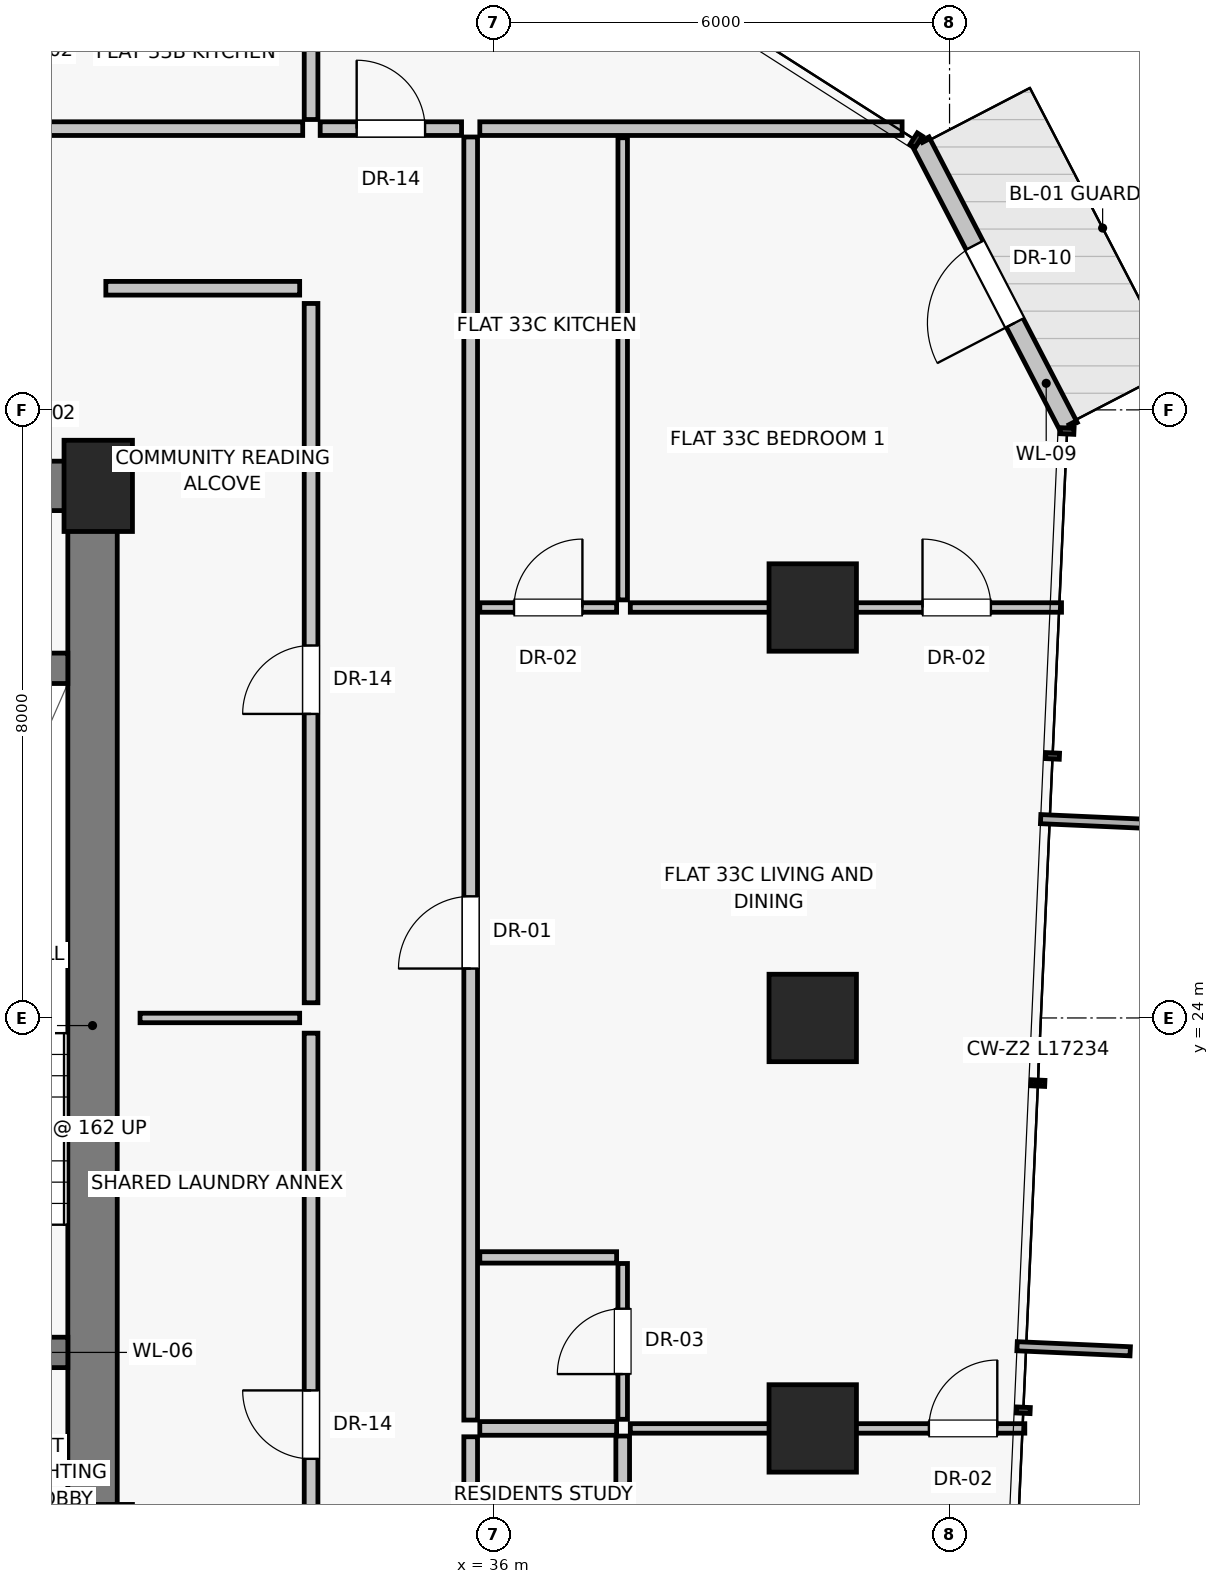
"""IFC4 building model, lengths in metres.
Left out: names, types, materials, properties, quantities, classifications, styles, units other than length and angle.
Written with IfcOpenShell. Run it as: python <this file> out.ifc"""

import sys

from ifc_helpers import new_model, si_unit, direction, frame, frame_2d, origin, origin_2d, place, context, subcontext, project, spatial, rectangle, extrude, source, transform, mapped, element, fill, save


model = new_model("IFC4")
c1 = context("Model", 3, precision=1e-05, world=origin(), true_north=direction((0.0, 1.0)))
c2 = subcontext(c1, "Body", "Model", "MODEL_VIEW")
j1 = project(units=[si_unit("LENGTHUNIT", "METRE"), si_unit("PLANEANGLEUNIT", "RADIAN")], contexts=[c1])
p1 = place(None, origin())
s1 = spatial("IfcSite", under=j1, at=p1, CompositionType="ELEMENT")
p2 = place(p1, origin())
s2 = spatial("IfcBuilding", under=s1, at=p2, CompositionType="ELEMENT")
p3 = place(p2, frame((0.0, 0.0, 119.75)))
s3 = spatial("IfcBuildingStorey", under=s2, at=p3, CompositionType="ELEMENT", Elevation=119.75)
p4 = place(p3, frame((30.8, 31.0, 0.0), z_axis=(0.0, 0.0, 1.0), x_axis=(1.0, 0.0, 0.0)))
e1 = element("IfcColumn", 1, at=p4, inside=s3, PredefinedType="PILASTER", context=c2, shape_type="SweptSolid", body=[
    extrude(rectangle(XDim=0.9, YDim=1.2, at=origin_2d()), origin(), (0.0, 0.0, 1.0), 3.25),
])
for number, where, z_axis, x_axis in (
    (2, (40.2, 18.6, 0.0), (0.0, 0.0, 1.0), (1.0, 0.0, 0.0)),
    (3, (40.2, 24.0, 0.0), (0.0, 0.0, 1.0), (1.0, 0.0, 0.0)),
    (4, (40.2, 29.4, 0.0), (0.0, 0.0, 1.0), (1.0, 0.0, 0.0)),
):
    element("IfcColumn", number, at=place(p3, frame(where, z_axis=z_axis, x_axis=x_axis)), inside=s3, PredefinedType="COLUMN", context=c2, shape_type="SweptSolid", body=[
        extrude(rectangle(XDim=1.15, YDim=1.15, at=origin_2d()), origin(), (0.0, 0.0, 1.0), 3.25),
    ])
p5 = place(p3, frame((43.569, 31.776, 0.0), z_axis=(0.0, 0.0, 1.0), x_axis=(-0.460795178744, 0.887506508847, 0.0)))
e5 = element("IfcWall", 5, at=p5, inside=s3, PredefinedType="SOLIDWALL", context=c2, shape_type="SweptSolid", body=[
    extrude(rectangle(XDim=4.233, YDim=0.25, at=frame_2d((2.117, 0.0))), origin(), (0.0, 0.0, 1.0), 3.0),
])
p6 = place(p5, frame((1.542, 0.0, 0.0)))
e6 = element("IfcOpeningElement", 6, at=p6, cuts=e5, PredefinedType="OPENING", context=c2, shape_type="SweptSolid", body=[
    extrude(rectangle(XDim=1.15, YDim=2.25, at=frame_2d((0.575, 1.125))), frame((0.0, 0.135, 0.0), z_axis=(0.0, -1.0, 0.0), x_axis=(1.0, 0.0, 0.0)), (0.0, 0.0, 1.0), 0.27),
])
p7 = place(p3, frame((30.725, 16.8, 0.0), z_axis=(0.0, 0.0, 1.0), x_axis=(0.0, 1.0, 0.0)))
e7 = element("IfcWall", 7, at=p7, inside=s3, PredefinedType="SHEAR", context=c2, shape_type="SweptSolid", body=[
    extrude(rectangle(XDim=14.2, YDim=0.65, at=frame_2d((7.1, 0.0))), origin(), (0.0, 0.0, 1.0), 3.0),
])
p8 = place(p3, frame((27.0, 31.0, 0.0), z_axis=(0.0, 0.0, 1.0), x_axis=(1.0, 0.0, 0.0)))
e8 = element("IfcWall", 8, at=p8, inside=s3, PredefinedType="SHEAR", context=c2, shape_type="SweptSolid", body=[
    extrude(rectangle(XDim=3.8, YDim=0.65, at=frame_2d((1.9, 0.0))), origin(), (0.0, 0.0, 1.0), 3.0),
])
p9 = place(p8, frame((1.15, 0.0, 0.0)))
e9 = element("IfcOpeningElement", 9, at=p9, cuts=e8, PredefinedType="OPENING", context=c2, shape_type="SweptSolid", body=[
    extrude(rectangle(XDim=1.0, YDim=2.01, at=frame_2d((0.5, 1.005))), frame((0.0, 0.335, 0.0), z_axis=(0.0, -1.0, 0.0), x_axis=(1.0, 0.0, 0.0)), (0.0, 0.0, 1.0), 0.67),
])
p10 = place(p3, frame((27.0, 19.6, 0.0), z_axis=(0.0, 0.0, 1.0), x_axis=(1.0, 0.0, 0.0)))
e10 = element("IfcWall", 10, at=p10, inside=s3, PredefinedType="SHEAR", context=c2, shape_type="SweptSolid", body=[
    extrude(rectangle(XDim=3.4, YDim=0.4, at=frame_2d((1.7, 0.0))), origin(), (0.0, 0.0, 1.0), 3.0),
])
p11 = place(p10, frame((1.05, 0.0, 0.0)))
e11 = element("IfcOpeningElement", 11, at=p11, cuts=e10, PredefinedType="OPENING", context=c2, shape_type="SweptSolid", body=[
    extrude(rectangle(XDim=1.1, YDim=2.03, at=frame_2d((0.55, 1.015))), frame((0.0, 0.21, 0.0), z_axis=(0.0, -1.0, 0.0), x_axis=(1.0, 0.0, 0.0)), (0.0, 0.0, 1.0), 0.42),
])
p12 = place(p3, frame((27.0, 28.6, 0.0), z_axis=(0.0, 0.0, 1.0), x_axis=(1.0, 0.0, 0.0)))
e12 = element("IfcWall", 12, at=p12, inside=s3, PredefinedType="SHEAR", context=c2, shape_type="SweptSolid", body=[
    extrude(rectangle(XDim=3.4, YDim=0.4, at=frame_2d((1.7, 0.0))), origin(), (0.0, 0.0, 1.0), 3.0),
])
p13 = place(p3, frame((33.6, 14.4, 0.0), z_axis=(0.0, 0.0, 1.0), x_axis=(0.0, 1.0, 0.0)))
e13 = element("IfcWall", 13, at=p13, inside=s3, PredefinedType="PARTITIONING", context=c2, shape_type="SweptSolid", body=[
    extrude(rectangle(XDim=9.4, YDim=0.18, at=frame_2d((4.7, 0.0))), origin(), (0.0, 0.0, 1.0), 3.0),
])
p14 = place(p13, frame((3.8, 0.0, 0.0)))
e14 = element("IfcOpeningElement", 14, at=p14, cuts=e13, PredefinedType="OPENING", context=c2, shape_type="SweptSolid", body=[
    extrude(rectangle(XDim=0.9, YDim=2.01, at=frame_2d((0.45, 1.005))), frame((0.0, 0.1, 0.0), z_axis=(0.0, -1.0, 0.0), x_axis=(1.0, 0.0, 0.0)), (0.0, 0.0, 1.0), 0.2),
])
p15 = place(p3, frame((33.6, 24.2, 0.0), z_axis=(0.0, 0.0, 1.0), x_axis=(0.0, 1.0, 0.0)))
e15 = element("IfcWall", 15, at=p15, inside=s3, PredefinedType="PARTITIONING", context=c2, shape_type="SweptSolid", body=[
    extrude(rectangle(XDim=9.2, YDim=0.18, at=frame_2d((4.6, 0.0))), origin(), (0.0, 0.0, 1.0), 3.0),
])
p16 = place(p15, frame((3.8, 0.0, 0.0)))
e16 = element("IfcOpeningElement", 16, at=p16, cuts=e15, PredefinedType="OPENING", context=c2, shape_type="SweptSolid", body=[
    extrude(rectangle(XDim=0.9, YDim=2.01, at=frame_2d((0.45, 1.005))), frame((0.0, 0.1, 0.0), z_axis=(0.0, -1.0, 0.0), x_axis=(1.0, 0.0, 0.0)), (0.0, 0.0, 1.0), 0.2),
])
p17 = place(p3, frame((31.35, 24.0, 0.0), z_axis=(0.0, 0.0, 1.0), x_axis=(1.0, 0.0, 0.0)))
e17 = element("IfcWall", 17, at=p17, inside=s3, PredefinedType="PARTITIONING", context=c2, shape_type="SweptSolid", body=[
    extrude(rectangle(XDim=2.1, YDim=0.125, at=frame_2d((1.05, 0.0))), origin(), (0.0, 0.0, 1.0), 3.0),
])
p18 = place(p3, frame((30.9, 33.6, 0.0), z_axis=(0.0, 0.0, 1.0), x_axis=(1.0, 0.0, 0.0)))
e18 = element("IfcWall", 18, at=p18, inside=s3, PredefinedType="PARTITIONING", context=c2, shape_type="SweptSolid", body=[
    extrude(rectangle(XDim=2.55, YDim=0.18, at=frame_2d((1.275, 0.0))), origin(), (0.0, 0.0, 1.0), 3.0),
])
p19 = place(p3, frame((33.6, 35.82, 0.0), z_axis=(0.0, 0.0, 1.0), x_axis=(0.0, 1.0, 0.0)))
e19 = element("IfcWall", 19, at=p19, inside=s3, PredefinedType="PARTITIONING", context=c2, shape_type="SweptSolid", body=[
    extrude(rectangle(XDim=4.845, YDim=0.18, at=frame_2d((2.423, 0.0))), origin(), (0.0, 0.0, 1.0), 3.0),
])
p20 = place(p3, frame((18.71, 35.7, 0.0), z_axis=(0.0, 0.0, 1.0), x_axis=(1.0, 0.0, 0.0)))
e20 = element("IfcWall", 20, at=p20, inside=s3, PredefinedType="PARTITIONING", context=c2, shape_type="SweptSolid", body=[
    extrude(rectangle(XDim=14.78, YDim=0.18, at=frame_2d((7.39, 0.0))), origin(), (0.0, 0.0, 1.0), 2.58),
])
p21 = place(p20, frame((5.94, 0.0, 0.0)))
e21 = element("IfcOpeningElement", 21, at=p21, cuts=e20, PredefinedType="OPENING", context=c2, shape_type="SweptSolid", body=[
    extrude(rectangle(XDim=0.95, YDim=2.02, at=frame_2d((0.475, 1.01))), frame((0.0, 0.1, 0.0), z_axis=(0.0, -1.0, 0.0), x_axis=(1.0, 0.0, 0.0)), (0.0, 0.0, 1.0), 0.2),
])
p22 = place(p3, frame((35.82, 35.7, 0.0), z_axis=(0.0, 0.0, 1.0), x_axis=(1.0, 0.0, 0.0)))
e22 = element("IfcWall", 22, at=p22, inside=s3, PredefinedType="PARTITIONING", context=c2, shape_type="SweptSolid", body=[
    extrude(rectangle(XDim=5.556, YDim=0.18, at=frame_2d((2.778, 0.0))), origin(), (0.0, 0.0, 1.0), 3.0),
])
p23 = place(p3, frame((35.7, 12.21, 0.0), z_axis=(0.0, 0.0, 1.0), x_axis=(0.0, 1.0, 0.0)))
e23 = element("IfcWall", 23, at=p23, inside=s3, PredefinedType="PARTITIONING", context=c2, shape_type="SweptSolid", body=[
    extrude(rectangle(XDim=6.28, YDim=0.18, at=frame_2d((3.14, 0.0))), origin(), (0.0, 0.0, 1.0), 2.58),
])
p24 = place(p23, frame((2.64, 0.0, 0.0)))
e24 = element("IfcOpeningElement", 24, at=p24, cuts=e23, PredefinedType="OPENING", context=c2, shape_type="SweptSolid", body=[
    extrude(rectangle(XDim=1.0, YDim=2.01, at=frame_2d((0.5, 1.005))), frame((0.0, 0.1, 0.0), z_axis=(0.0, -1.0, 0.0), x_axis=(1.0, 0.0, 0.0)), (0.0, 0.0, 1.0), 0.2),
])
p25 = place(p3, frame((35.7, 18.71, 0.0), z_axis=(0.0, 0.0, 1.0), x_axis=(0.0, 1.0, 0.0)))
e25 = element("IfcWall", 25, at=p25, inside=s3, PredefinedType="PARTITIONING", context=c2, shape_type="SweptSolid", body=[
    extrude(rectangle(XDim=16.88, YDim=0.18, at=frame_2d((8.44, 0.0))), origin(), (0.0, 0.0, 1.0), 2.58),
])
p26 = place(p25, frame((5.94, 0.0, 0.0)))
e26 = element("IfcOpeningElement", 26, at=p26, cuts=e25, PredefinedType="OPENING", context=c2, shape_type="SweptSolid", body=[
    extrude(rectangle(XDim=0.95, YDim=2.02, at=frame_2d((0.475, 1.01))), frame((0.0, 0.1, 0.0), z_axis=(0.0, -1.0, 0.0), x_axis=(1.0, 0.0, 0.0)), (0.0, 0.0, 1.0), 0.2),
])
p27 = place(p3, frame((37.7, 12.22, 0.0), z_axis=(0.0, 0.0, 1.0), x_axis=(0.0, 1.0, 0.0)))
e27 = element("IfcWall", 27, at=p27, inside=s3, PredefinedType="PARTITIONING", context=c2, shape_type="SweptSolid", body=[
    extrude(rectangle(XDim=6.28, YDim=0.18, at=frame_2d((3.14, 0.0))), origin(), (0.0, 0.0, 1.0), 3.0),
])
p28 = place(p3, frame((35.82, 18.6, 0.0), z_axis=(0.0, 0.0, 1.0), x_axis=(1.0, 0.0, 0.0)))
e28 = element("IfcWall", 28, at=p28, inside=s3, PredefinedType="PARTITIONING", context=c2, shape_type="SweptSolid", body=[
    extrude(rectangle(XDim=1.8, YDim=0.18, at=frame_2d((0.9, 0.0))), origin(), (0.0, 0.0, 1.0), 2.378),
])
p29 = place(p3, frame((37.8, 18.6, 0.0), z_axis=(0.0, 0.0, 1.0), x_axis=(1.0, 0.0, 0.0)))
e29 = element("IfcWall", 29, at=p29, inside=s3, PredefinedType="PARTITIONING", context=c2, shape_type="SweptSolid", body=[
    extrude(rectangle(XDim=5.19, YDim=0.125, at=frame_2d((2.595, 0.0))), origin(), (0.0, 0.0, 1.0), 2.378),
])
p30 = place(p29, frame((3.928, 0.0, 0.0)))
e30 = element("IfcOpeningElement", 30, at=p30, cuts=e29, PredefinedType="OPENING", context=c2, shape_type="SweptSolid", body=[
    extrude(rectangle(XDim=0.9, YDim=2.01, at=frame_2d((0.45, 1.005))), frame((0.0, 0.073, 0.0), z_axis=(0.0, -1.0, 0.0), x_axis=(1.0, 0.0, 0.0)), (0.0, 0.0, 1.0), 0.145),
])
p31 = place(p3, frame((35.82, 20.85, 0.0), z_axis=(0.0, 0.0, 1.0), x_axis=(1.0, 0.0, 0.0)))
e31 = element("IfcWall", 31, at=p31, inside=s3, PredefinedType="PARTITIONING", context=c2, shape_type="SweptSolid", body=[
    extrude(rectangle(XDim=1.8, YDim=0.15, at=frame_2d((0.9, 0.0))), origin(), (0.0, 0.0, 1.0), 3.0),
])
p32 = place(p3, frame((37.7, 18.72, 0.0), z_axis=(0.0, 0.0, 1.0), x_axis=(0.0, 1.0, 0.0)))
e32 = element("IfcWall", 32, at=p32, inside=s3, PredefinedType="PARTITIONING", context=c2, shape_type="SweptSolid", body=[
    extrude(rectangle(XDim=2.05, YDim=0.125, at=frame_2d((1.025, 0.0))), origin(), (0.0, 0.0, 1.0), 3.0),
])
p33 = place(p32, frame((0.595, 0.0, 0.0)))
e33 = element("IfcOpeningElement", 33, at=p33, cuts=e32, PredefinedType="OPENING", context=c2, shape_type="SweptSolid", body=[
    extrude(rectangle(XDim=0.86, YDim=2.01, at=frame_2d((0.43, 1.005))), frame((0.0, 0.073, 0.0), z_axis=(0.0, -1.0, 0.0), x_axis=(1.0, 0.0, 0.0)), (0.0, 0.0, 1.0), 0.145),
])
p34 = place(p3, frame((35.82, 29.4, 0.0), z_axis=(0.0, 0.0, 1.0), x_axis=(1.0, 0.0, 0.0)))
e34 = element("IfcWall", 34, at=p34, inside=s3, PredefinedType="PARTITIONING", context=c2, shape_type="SweptSolid", body=[
    extrude(rectangle(XDim=1.8, YDim=0.125, at=frame_2d((0.9, 0.0))), origin(), (0.0, 0.0, 1.0), 2.378),
])
p35 = place(p34, frame((0.45, 0.0, 0.0)))
e35 = element("IfcOpeningElement", 35, at=p35, cuts=e34, PredefinedType="OPENING", context=c2, shape_type="SweptSolid", body=[
    extrude(rectangle(XDim=0.9, YDim=2.01, at=frame_2d((0.45, 1.005))), frame((0.0, 0.073, 0.0), z_axis=(0.0, -1.0, 0.0), x_axis=(1.0, 0.0, 0.0)), (0.0, 0.0, 1.0), 0.145),
])
p36 = place(p3, frame((37.7, 29.5, 0.0), z_axis=(0.0, 0.0, 1.0), x_axis=(0.0, 1.0, 0.0)))
e36 = element("IfcWall", 36, at=p36, inside=s3, PredefinedType="PARTITIONING", context=c2, shape_type="SweptSolid", body=[
    extrude(rectangle(XDim=6.08, YDim=0.125, at=frame_2d((3.04, 0.0))), origin(), (0.0, 0.0, 1.0), 3.0),
])
p37 = place(p3, frame((37.8, 29.4, 0.0), z_axis=(0.0, 0.0, 1.0), x_axis=(1.0, 0.0, 0.0)))
e37 = element("IfcWall", 37, at=p37, inside=s3, PredefinedType="PARTITIONING", context=c2, shape_type="SweptSolid", body=[
    extrude(rectangle(XDim=5.673, YDim=0.125, at=frame_2d((2.836, 0.0))), origin(), (0.0, 0.0, 1.0), 2.378),
])
p38 = place(p37, frame((3.844, 0.0, 0.0)))
e38 = element("IfcOpeningElement", 38, at=p38, cuts=e37, PredefinedType="OPENING", context=c2, shape_type="SweptSolid", body=[
    extrude(rectangle(XDim=0.9, YDim=2.01, at=frame_2d((0.45, 1.005))), frame((0.0, 0.073, 0.0), z_axis=(0.0, -1.0, 0.0), x_axis=(1.0, 0.0, 0.0)), (0.0, 0.0, 1.0), 0.145),
])
p39 = place(p3, frame((33.72, 35.7, 0.0), z_axis=(0.0, 0.0, 1.0), x_axis=(1.0, 0.0, 0.0)))
e39 = element("IfcWall", 39, at=p39, inside=s3, PredefinedType="PARTITIONING", context=c2, shape_type="SweptSolid", body=[
    extrude(rectangle(XDim=1.86, YDim=0.18, at=frame_2d((0.93, 0.0))), origin(), (0.0, 0.0, 1.0), 3.0),
])
p40 = place(p39, frame((0.48, 0.0, 0.0)))
e40 = element("IfcOpeningElement", 40, at=p40, cuts=e39, PredefinedType="OPENING", context=c2, shape_type="SweptSolid", body=[
    extrude(rectangle(XDim=0.9, YDim=2.01, at=frame_2d((0.45, 1.005))), frame((0.0, 0.1, 0.0), z_axis=(0.0, -1.0, 0.0), x_axis=(1.0, 0.0, 0.0)), (0.0, 0.0, 1.0), 0.2),
])
m1 = source(origin(), c2, "Body", "SweptSolid", [
    extrude(rectangle(XDim=1.15, YDim=2.25, at=frame_2d((0.575, 1.125))), frame((0.0, 0.025, 0.0), z_axis=(0.0, -1.0, 0.0), x_axis=(1.0, 0.0, 0.0)), (0.0, 0.0, 1.0), 0.05),
])
p41 = place(p6, frame((1.15, 0.0, 0.0), z_axis=(0.0, 0.0, 1.0), x_axis=(-1.0, 0.0, 0.0)))
e41 = element("IfcDoor", 41, at=p41, inside=s3, OperationType="SINGLE_SWING_LEFT", PredefinedType="DOOR", context=c2, shape_type="MappedRepresentation", body=[
    mapped(m1, transform((0.0, 0.0, 0.0), scale=1.0)),
])
fill(e6, e41)
m2 = source(origin(), c2, "Body", "SweptSolid", [
    extrude(rectangle(XDim=0.9, YDim=2.01, at=frame_2d((0.45, 1.005))), frame((0.0, 0.025, 0.0), z_axis=(0.0, -1.0, 0.0), x_axis=(1.0, 0.0, 0.0)), (0.0, 0.0, 1.0), 0.05),
])
p42 = place(p14, origin())
e42 = element("IfcDoor", 42, at=p42, inside=s3, OperationType="SINGLE_SWING_RIGHT", PredefinedType="DOOR", context=c2, shape_type="MappedRepresentation", body=[
    mapped(m2, transform((0.0, 0.0, 0.0), scale=1.0)),
])
fill(e14, e42)
p43 = place(p16, origin())
e43 = element("IfcDoor", 43, at=p43, inside=s3, OperationType="SINGLE_SWING_LEFT", PredefinedType="DOOR", context=c2, shape_type="MappedRepresentation", body=[
    mapped(m2, transform((0.0, 0.0, 0.0), scale=1.0)),
])
fill(e16, e43)
m3 = source(origin(), c2, "Body", "SweptSolid", [
    extrude(rectangle(XDim=0.95, YDim=2.02, at=frame_2d((0.475, 1.01))), frame((0.0, 0.025, 0.0), z_axis=(0.0, -1.0, 0.0), x_axis=(1.0, 0.0, 0.0)), (0.0, 0.0, 1.0), 0.05),
])
p44 = place(p26, origin())
e44 = element("IfcDoor", 44, at=p44, inside=s3, OperationType="SINGLE_SWING_LEFT", PredefinedType="DOOR", context=c2, shape_type="MappedRepresentation", body=[
    mapped(m3, transform((0.0, 0.0, 0.0), scale=1.0)),
])
fill(e26, e44)
p45 = place(p30, origin())
e45 = element("IfcDoor", 45, at=p45, inside=s3, OperationType="SINGLE_SWING_RIGHT", PredefinedType="DOOR", context=c2, shape_type="MappedRepresentation", body=[
    mapped(m2, transform((0.0, 0.0, 0.0), scale=1.0)),
])
fill(e30, e45)
m4 = source(origin(), c2, "Body", "SweptSolid", [
    extrude(rectangle(XDim=0.86, YDim=2.01, at=frame_2d((0.43, 1.005))), frame((0.0, 0.025, 0.0), z_axis=(0.0, -1.0, 0.0), x_axis=(1.0, 0.0, 0.0)), (0.0, 0.0, 1.0), 0.05),
])
p46 = place(p33, origin())
e46 = element("IfcDoor", 46, at=p46, inside=s3, OperationType="SINGLE_SWING_LEFT", PredefinedType="DOOR", context=c2, shape_type="MappedRepresentation", body=[
    mapped(m4, transform((0.0, 0.0, 0.0), scale=1.0)),
])
fill(e33, e46)
p47 = place(p35, origin())
e47 = element("IfcDoor", 47, at=p47, inside=s3, OperationType="SINGLE_SWING_RIGHT", PredefinedType="DOOR", context=c2, shape_type="MappedRepresentation", body=[
    mapped(m2, transform((0.0, 0.0, 0.0), scale=1.0)),
])
fill(e35, e47)
p48 = place(p38, origin())
e48 = element("IfcDoor", 48, at=p48, inside=s3, OperationType="SINGLE_SWING_LEFT", PredefinedType="DOOR", context=c2, shape_type="MappedRepresentation", body=[
    mapped(m2, transform((0.0, 0.0, 0.0), scale=1.0)),
])
fill(e38, e48)
p49 = place(p40, origin())
e49 = element("IfcDoor", 49, at=p49, inside=s3, OperationType="SINGLE_SWING_LEFT", PredefinedType="DOOR", context=c2, shape_type="MappedRepresentation", body=[
    mapped(m2, transform((0.0, 0.0, 0.0), scale=1.0)),
])
fill(e40, e49)
save(model, sys.argv[1])
